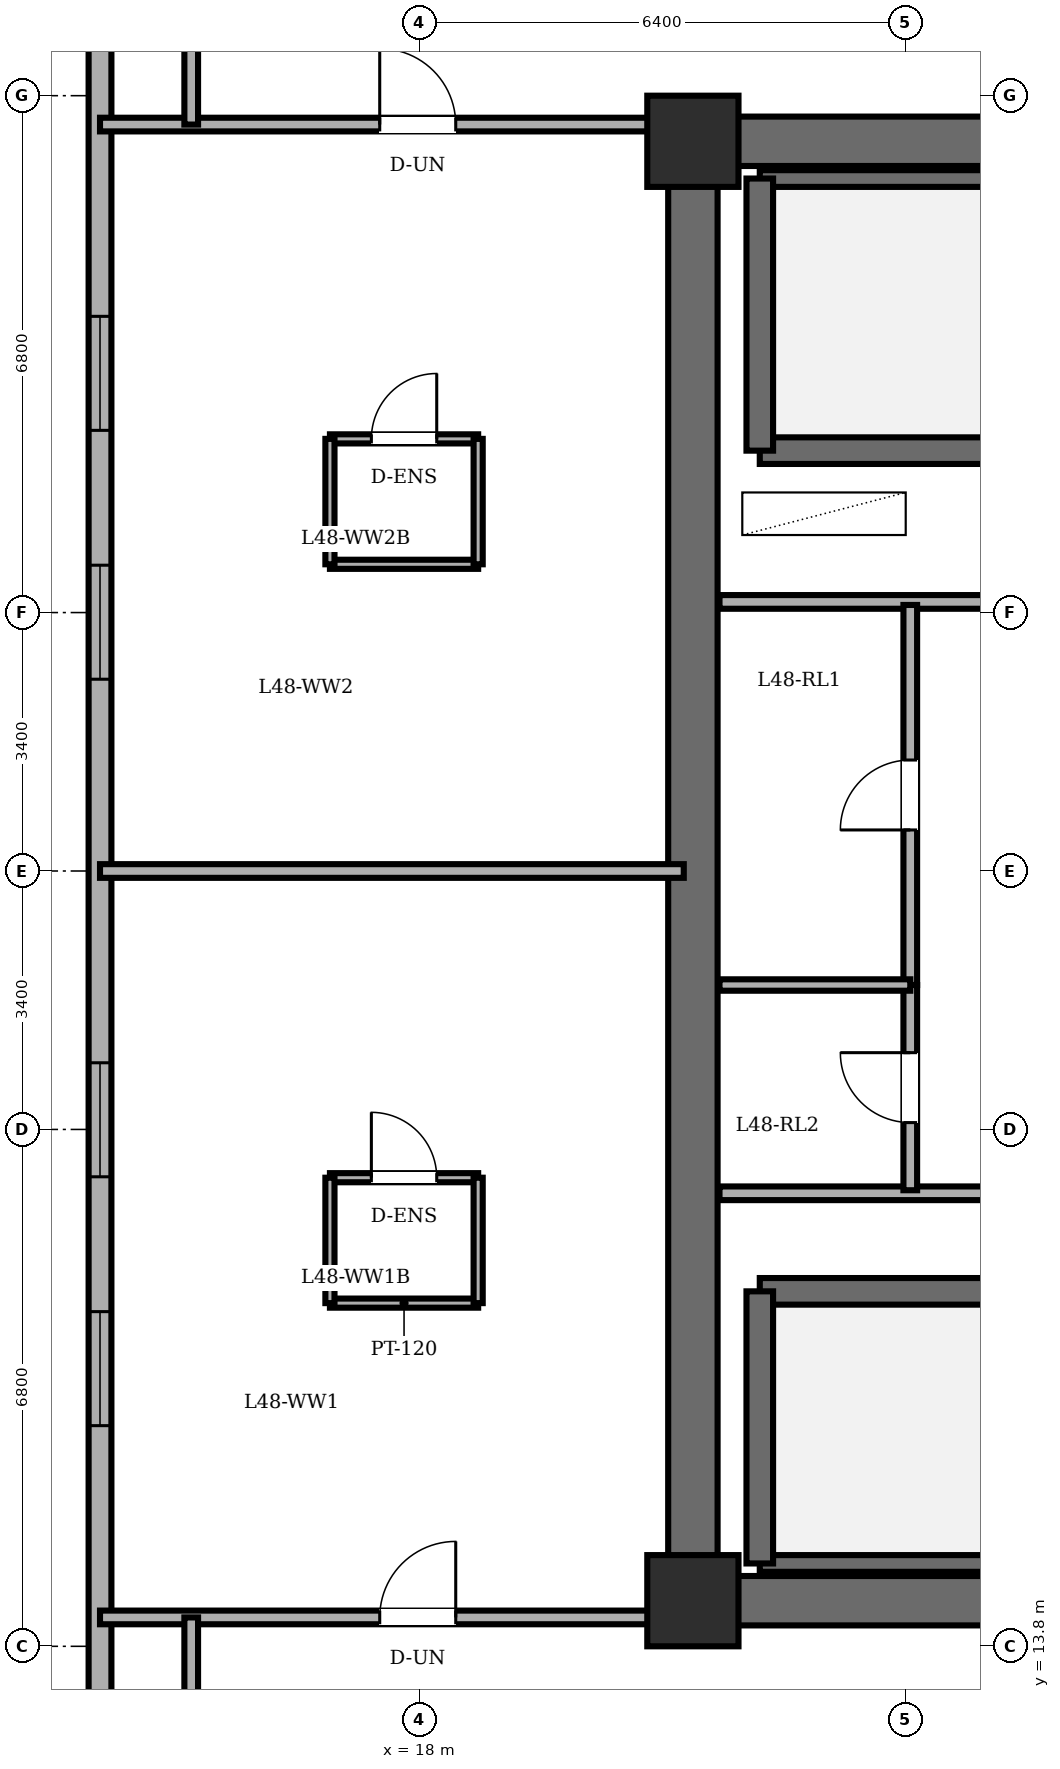
"""IFC4 building model, lengths in metres.
Left out: names, types, materials, properties, quantities, classifications, styles, units other than length and angle.
Written with IfcOpenShell. Run it as: python <this file> out.ifc"""

import sys

from ifc_helpers import new_model, si_unit, direction, frame, frame_2d, origin, origin_2d, place, context, subcontext, project, spatial, rectangle, extrude, element, fill, save


model = new_model("IFC4")
c1 = context("Model", 3, precision=1e-05, world=origin(), true_north=direction((0.0, 1.0)))
c2 = subcontext(c1, "Body", "Model", "MODEL_VIEW")
j1 = project(units=[si_unit("LENGTHUNIT", "METRE"), si_unit("PLANEANGLEUNIT", "RADIAN")], contexts=[c1])
p1 = place(None, origin())
s1 = spatial("IfcSite", under=j1, at=p1, CompositionType="ELEMENT")
p2 = place(p1, origin())
s2 = spatial("IfcBuilding", under=s1, at=p2, CompositionType="ELEMENT")
p3 = place(p2, frame((0.0, 0.0, 183.4)))
s3 = spatial("IfcBuildingStorey", under=s2, at=p3, CompositionType="ELEMENT", Elevation=183.4)
for number, where, z_axis, x_axis in (
    (1, (21.6, 14.4, 0.0), (0.0, 0.0, 1.0), (1.0, 0.0, 0.0)),
    (2, (21.6, 33.6, 0.0), (0.0, 0.0, 1.0), (1.0, 0.0, 0.0)),
):
    element("IfcColumn", number, at=place(p3, frame(where, z_axis=z_axis, x_axis=x_axis)), inside=s3, PredefinedType="COLUMN", context=c2, shape_type="SweptSolid", body=[
        extrude(rectangle(XDim=1.2, YDim=1.2, at=origin_2d()), origin(), (0.0, 0.0, 1.0), 3.6),
    ])
p4 = place(p3, frame((13.8, 36.3, 0.0), z_axis=(0.0, 0.0, 1.0), x_axis=(0.0, -1.0, 0.0)))
e3 = element("IfcWall", 3, at=p4, inside=s3, PredefinedType="SOLIDWALL", context=c2, shape_type="SweptSolid", body=[
    extrude(rectangle(XDim=24.6, YDim=0.3, at=frame_2d((12.3, 0.0))), origin(), (0.0, 0.0, 1.0), 3.4),
])
p5 = place(p4, frame((5.003, 0.0, 0.85)))
e4 = element("IfcOpeningElement", 4, at=p5, cuts=e3, PredefinedType="OPENING", context=c2, shape_type="SweptSolid", body=[
    extrude(rectangle(XDim=1.5, YDim=1.55, at=frame_2d((0.75, 0.775))), frame((0.0, 0.16, 0.0), z_axis=(0.0, -1.0, 0.0), x_axis=(1.0, 0.0, 0.0)), (0.0, 0.0, 1.0), 0.32),
])
p6 = place(p4, frame((8.277, 0.0, 0.85)))
e5 = element("IfcOpeningElement", 5, at=p6, cuts=e3, PredefinedType="OPENING", context=c2, shape_type="SweptSolid", body=[
    extrude(rectangle(XDim=1.5, YDim=1.55, at=frame_2d((0.75, 0.775))), frame((0.0, 0.16, 0.0), z_axis=(0.0, -1.0, 0.0), x_axis=(1.0, 0.0, 0.0)), (0.0, 0.0, 1.0), 0.32),
])
p7 = place(p4, frame((14.823, 0.0, 0.85)))
e6 = element("IfcOpeningElement", 6, at=p7, cuts=e3, PredefinedType="OPENING", context=c2, shape_type="SweptSolid", body=[
    extrude(rectangle(XDim=1.5, YDim=1.55, at=frame_2d((0.75, 0.775))), frame((0.0, 0.16, 0.0), z_axis=(0.0, -1.0, 0.0), x_axis=(1.0, 0.0, 0.0)), (0.0, 0.0, 1.0), 0.32),
])
p8 = place(p4, frame((18.097, 0.0, 0.85)))
e7 = element("IfcOpeningElement", 7, at=p8, cuts=e3, PredefinedType="OPENING", context=c2, shape_type="SweptSolid", body=[
    extrude(rectangle(XDim=1.5, YDim=1.55, at=frame_2d((0.75, 0.775))), frame((0.0, 0.16, 0.0), z_axis=(0.0, -1.0, 0.0), x_axis=(1.0, 0.0, 0.0)), (0.0, 0.0, 1.0), 0.32),
])
p9 = place(p3, frame((21.6, 14.4, 0.0), z_axis=(0.0, 0.0, 1.0), x_axis=(0.0, 1.0, 0.0)))
e8 = element("IfcWall", 8, at=p9, inside=s3, PredefinedType="SHEAR", context=c2, shape_type="SweptSolid", body=[
    extrude(rectangle(XDim=19.2, YDim=0.65, at=frame_2d((9.6, 0.0))), origin(), (0.0, 0.0, 1.0), 3.4),
])
for number, where, z_axis, x_axis in (
    (9, (21.6, 33.6, 0.0), (0.0, 0.0, 1.0), (1.0, 0.0, 0.0)),
    (10, (37.2, 14.4, 0.0), (0.0, 0.0, 1.0), (-1.0, 0.0, 0.0)),
):
    element("IfcWall", number, at=place(p3, frame(where, z_axis=z_axis, x_axis=x_axis)), inside=s3, PredefinedType="SHEAR", context=c2, shape_type="SweptSolid", body=[
        extrude(rectangle(XDim=15.6, YDim=0.65, at=frame_2d((7.8, 0.0))), origin(), (0.0, 0.0, 1.0), 3.4),
    ])
p10 = place(p3, frame((22.48, 29.53, 0.0), z_axis=(0.0, 0.0, 1.0), x_axis=(1.0, 0.0, 0.0)))
e11 = element("IfcWall", 11, at=p10, inside=s3, PredefinedType="SOLIDWALL", context=c2, shape_type="SweptSolid", body=[
    extrude(rectangle(XDim=7.79, YDim=0.35, at=frame_2d((3.895, 0.0))), origin(), (0.0, 0.0, 1.0), 3.4),
])
p11 = place(p3, frame((22.48, 33.11, 0.0), z_axis=(0.0, 0.0, 1.0), x_axis=(1.0, 0.0, 0.0)))
e12 = element("IfcWall", 12, at=p11, inside=s3, PredefinedType="PARTITIONING", context=c2, shape_type="SweptSolid", body=[
    extrude(rectangle(XDim=7.79, YDim=0.22, at=frame_2d((3.895, 0.0))), origin(), (0.0, 0.0, 1.0), 3.4),
])
p12 = place(p3, frame((22.48, 29.53, 0.0), z_axis=(0.0, 0.0, 1.0), x_axis=(0.0, 1.0, 0.0)))
e13 = element("IfcWall", 13, at=p12, inside=s3, PredefinedType="SOLIDWALL", context=c2, shape_type="SweptSolid", body=[
    extrude(rectangle(XDim=3.58, YDim=0.35, at=frame_2d((1.79, 0.0))), origin(), (0.0, 0.0, 1.0), 3.4),
])
p13 = place(p3, frame((22.48, 18.47, 0.0), z_axis=(0.0, 0.0, 1.0), x_axis=(1.0, 0.0, 0.0)))
e14 = element("IfcWall", 14, at=p13, inside=s3, PredefinedType="SOLIDWALL", context=c2, shape_type="SweptSolid", body=[
    extrude(rectangle(XDim=7.79, YDim=0.35, at=frame_2d((3.895, 0.0))), origin(), (0.0, 0.0, 1.0), 3.4),
])
p14 = place(p3, frame((22.48, 14.89, 0.0), z_axis=(0.0, 0.0, 1.0), x_axis=(1.0, 0.0, 0.0)))
e15 = element("IfcWall", 15, at=p14, inside=s3, PredefinedType="PARTITIONING", context=c2, shape_type="SweptSolid", body=[
    extrude(rectangle(XDim=7.79, YDim=0.22, at=frame_2d((3.895, 0.0))), origin(), (0.0, 0.0, 1.0), 3.4),
])
p15 = place(p3, frame((22.48, 14.89, 0.0), z_axis=(0.0, 0.0, 1.0), x_axis=(0.0, 1.0, 0.0)))
e16 = element("IfcWall", 16, at=p15, inside=s3, PredefinedType="SOLIDWALL", context=c2, shape_type="SweptSolid", body=[
    extrude(rectangle(XDim=3.58, YDim=0.35, at=frame_2d((1.79, 0.0))), origin(), (0.0, 0.0, 1.0), 3.4),
])
p16 = place(p3, frame((21.95, 27.54, 0.0), z_axis=(0.0, 0.0, 1.0), x_axis=(1.0, 0.0, 0.0)))
e17 = element("IfcWall", 17, at=p16, inside=s3, PredefinedType="PARTITIONING", context=c2, shape_type="SweptSolid", body=[
    extrude(rectangle(XDim=10.56, YDim=0.18, at=frame_2d((5.28, 0.0))), origin(), (0.0, 0.0, 1.0), 3.4),
])
p17 = place(p3, frame((21.95, 19.76, 0.0), z_axis=(0.0, 0.0, 1.0), x_axis=(1.0, 0.0, 0.0)))
e18 = element("IfcWall", 18, at=p17, inside=s3, PredefinedType="PARTITIONING", context=c2, shape_type="SweptSolid", body=[
    extrude(rectangle(XDim=14.87, YDim=0.18, at=frame_2d((7.435, 0.0))), origin(), (0.0, 0.0, 1.0), 3.4),
])
p18 = place(p3, frame((24.46, 22.5, 0.0), z_axis=(0.0, 0.0, 1.0), x_axis=(0.0, 1.0, 0.0)))
e19 = element("IfcWall", 19, at=p18, inside=s3, PredefinedType="PARTITIONING", context=c2, shape_type="SweptSolid", body=[
    extrude(rectangle(XDim=5.0, YDim=0.18, at=frame_2d((2.5, 0.0))), origin(), (0.0, 0.0, 1.0), 3.4),
])
p19 = place(p18, frame((2.04, 0.0, 0.0)))
e20 = element("IfcOpeningElement", 20, at=p19, cuts=e19, PredefinedType="OPENING", context=c2, shape_type="SweptSolid", body=[
    extrude(rectangle(XDim=0.92, YDim=2.1, at=frame_2d((0.46, 1.05))), frame((0.0, 0.1, 0.0), z_axis=(0.0, -1.0, 0.0), x_axis=(1.0, 0.0, 0.0)), (0.0, 0.0, 1.0), 0.2),
])
p20 = place(p3, frame((24.46, 19.8, 0.0), z_axis=(0.0, 0.0, 1.0), x_axis=(0.0, 1.0, 0.0)))
e21 = element("IfcWall", 21, at=p20, inside=s3, PredefinedType="PARTITIONING", context=c2, shape_type="SweptSolid", body=[
    extrude(rectangle(XDim=2.7, YDim=0.18, at=frame_2d((1.35, 0.0))), origin(), (0.0, 0.0, 1.0), 3.4),
])
p21 = place(p20, frame((0.89, 0.0, 0.0)))
e22 = element("IfcOpeningElement", 22, at=p21, cuts=e21, PredefinedType="OPENING", context=c2, shape_type="SweptSolid", body=[
    extrude(rectangle(XDim=0.92, YDim=2.1, at=frame_2d((0.46, 1.05))), frame((0.0, 0.1, 0.0), z_axis=(0.0, -1.0, 0.0), x_axis=(1.0, 0.0, 0.0)), (0.0, 0.0, 1.0), 0.2),
])
p22 = place(p3, frame((21.95, 22.5, 0.0), z_axis=(0.0, 0.0, 1.0), x_axis=(1.0, 0.0, 0.0)))
e23 = element("IfcWall", 23, at=p22, inside=s3, PredefinedType="PARTITIONING", context=c2, shape_type="SweptSolid", body=[
    extrude(rectangle(XDim=2.51, YDim=0.15, at=frame_2d((1.255, 0.0))), origin(), (0.0, 0.0, 1.0), 3.4),
])
p23 = place(p3, frame((16.825, 19.965, 0.0), z_axis=(0.0, 0.0, 1.0), x_axis=(1.0, 0.0, 0.0)))
e24 = element("IfcWall", 24, at=p23, inside=s3, PredefinedType="PARTITIONING", context=c2, shape_type="SweptSolid", body=[
    extrude(rectangle(XDim=1.95, YDim=0.12, at=frame_2d((0.975, 0.0))), origin(), (0.0, 0.0, 1.0), 3.4),
])
p24 = place(p23, frame((0.545, 0.0, 0.0)))
e25 = element("IfcOpeningElement", 25, at=p24, cuts=e24, PredefinedType="OPENING", context=c2, shape_type="SweptSolid", body=[
    extrude(rectangle(XDim=0.86, YDim=2.1, at=frame_2d((0.43, 1.05))), frame((0.0, 0.07, 0.0), z_axis=(0.0, -1.0, 0.0), x_axis=(1.0, 0.0, 0.0)), (0.0, 0.0, 1.0), 0.14),
])
p25 = place(p3, frame((18.775, 18.315, 0.0), z_axis=(0.0, 0.0, 1.0), x_axis=(-1.0, 0.0, 0.0)))
e26 = element("IfcWall", 26, at=p25, inside=s3, PredefinedType="PARTITIONING", context=c2, shape_type="SweptSolid", body=[
    extrude(rectangle(XDim=1.95, YDim=0.12, at=frame_2d((0.975, 0.0))), origin(), (0.0, 0.0, 1.0), 3.4),
])
for number, where, z_axis, x_axis in (
    (27, (16.825, 19.965, 0.0), (0.0, 0.0, 1.0), (0.0, -1.0, 0.0)),
    (28, (18.775, 18.315, 0.0), (0.0, 0.0, 1.0), (0.0, 1.0, 0.0)),
):
    element("IfcWall", number, at=place(p3, frame(where, z_axis=z_axis, x_axis=x_axis)), inside=s3, PredefinedType="PARTITIONING", context=c2, shape_type="SweptSolid", body=[
        extrude(rectangle(XDim=1.65, YDim=0.12, at=frame_2d((0.825, 0.0))), origin(), (0.0, 0.0, 1.0), 3.4),
    ])
p26 = place(p3, frame((16.825, 29.685, 0.0), z_axis=(0.0, 0.0, 1.0), x_axis=(1.0, 0.0, 0.0)))
e29 = element("IfcWall", 29, at=p26, inside=s3, PredefinedType="PARTITIONING", context=c2, shape_type="SweptSolid", body=[
    extrude(rectangle(XDim=1.95, YDim=0.12, at=frame_2d((0.975, 0.0))), origin(), (0.0, 0.0, 1.0), 3.4),
])
p27 = place(p26, frame((0.545, 0.0, 0.0)))
e30 = element("IfcOpeningElement", 30, at=p27, cuts=e29, PredefinedType="OPENING", context=c2, shape_type="SweptSolid", body=[
    extrude(rectangle(XDim=0.86, YDim=2.1, at=frame_2d((0.43, 1.05))), frame((0.0, 0.07, 0.0), z_axis=(0.0, -1.0, 0.0), x_axis=(1.0, 0.0, 0.0)), (0.0, 0.0, 1.0), 0.14),
])
p28 = place(p3, frame((18.775, 28.035, 0.0), z_axis=(0.0, 0.0, 1.0), x_axis=(-1.0, 0.0, 0.0)))
e31 = element("IfcWall", 31, at=p28, inside=s3, PredefinedType="PARTITIONING", context=c2, shape_type="SweptSolid", body=[
    extrude(rectangle(XDim=1.95, YDim=0.12, at=frame_2d((0.975, 0.0))), origin(), (0.0, 0.0, 1.0), 3.4),
])
for number, where, z_axis, x_axis in (
    (32, (16.825, 29.685, 0.0), (0.0, 0.0, 1.0), (0.0, -1.0, 0.0)),
    (33, (18.775, 28.035, 0.0), (0.0, 0.0, 1.0), (0.0, 1.0, 0.0)),
):
    element("IfcWall", number, at=place(p3, frame(where, z_axis=z_axis, x_axis=x_axis)), inside=s3, PredefinedType="PARTITIONING", context=c2, shape_type="SweptSolid", body=[
        extrude(rectangle(XDim=1.65, YDim=0.12, at=frame_2d((0.825, 0.0))), origin(), (0.0, 0.0, 1.0), 3.4),
    ])
p29 = place(p3, frame((13.8, 14.18, 0.0), z_axis=(0.0, 0.0, 1.0), x_axis=(1.0, 0.0, 0.0)))
e34 = element("IfcWall", 34, at=p29, inside=s3, PredefinedType="PARTITIONING", context=c2, shape_type="SweptSolid", body=[
    extrude(rectangle(XDim=7.68, YDim=0.18, at=frame_2d((3.84, 0.0))), origin(), (0.0, 0.0, 1.0), 3.4),
])
p30 = place(p29, frame((3.68, 0.0, 0.0)))
e35 = element("IfcOpeningElement", 35, at=p30, cuts=e34, PredefinedType="OPENING", context=c2, shape_type="SweptSolid", body=[
    extrude(rectangle(XDim=1.0, YDim=2.15, at=frame_2d((0.5, 1.075))), frame((0.0, 0.1, 0.0), z_axis=(0.0, -1.0, 0.0), x_axis=(1.0, 0.0, 0.0)), (0.0, 0.0, 1.0), 0.2),
])
p31 = place(p3, frame((13.8, 24.0, 0.0), z_axis=(0.0, 0.0, 1.0), x_axis=(1.0, 0.0, 0.0)))
e36 = element("IfcWall", 36, at=p31, inside=s3, PredefinedType="PARTITIONING", context=c2, shape_type="SweptSolid", body=[
    extrude(rectangle(XDim=7.68, YDim=0.18, at=frame_2d((3.84, 0.0))), origin(), (0.0, 0.0, 1.0), 3.4),
])
p32 = place(p3, frame((13.8, 33.82, 0.0), z_axis=(0.0, 0.0, 1.0), x_axis=(1.0, 0.0, 0.0)))
e37 = element("IfcWall", 37, at=p32, inside=s3, PredefinedType="PARTITIONING", context=c2, shape_type="SweptSolid", body=[
    extrude(rectangle(XDim=7.68, YDim=0.18, at=frame_2d((3.84, 0.0))), origin(), (0.0, 0.0, 1.0), 3.4),
])
p33 = place(p32, frame((3.68, 0.0, 0.0)))
e38 = element("IfcOpeningElement", 38, at=p33, cuts=e37, PredefinedType="OPENING", context=c2, shape_type="SweptSolid", body=[
    extrude(rectangle(XDim=1.0, YDim=2.15, at=frame_2d((0.5, 1.075))), frame((0.0, 0.1, 0.0), z_axis=(0.0, -1.0, 0.0), x_axis=(1.0, 0.0, 0.0)), (0.0, 0.0, 1.0), 0.2),
])
for number, where, z_axis, x_axis in (
    (39, (15.0, 8.487, 0.0), (0.0, 0.0, 1.0), (0.0, 1.0, 0.0)),
    (40, (15.0, 33.82, 0.0), (0.0, 0.0, 1.0), (0.0, 1.0, 0.0)),
):
    element("IfcWall", number, at=place(p3, frame(where, z_axis=z_axis, x_axis=x_axis)), inside=s3, PredefinedType="PARTITIONING", context=c2, shape_type="SweptSolid", body=[
        extrude(rectangle(XDim=5.693, YDim=0.18, at=frame_2d((2.846, 0.0))), origin(), (0.0, 0.0, 1.0), 3.4),
    ])
p34 = place(p5, origin())
e41 = element("IfcWindow", 41, at=p34, inside=s3, PartitioningType="DOUBLE_PANEL_VERTICAL", PredefinedType="WINDOW", context=c2, shape_type="SweptSolid", body=[
    extrude(rectangle(XDim=1.5, YDim=1.55, at=frame_2d((0.75, 0.775))), frame((0.0, 0.03, 0.0), z_axis=(0.0, -1.0, 0.0), x_axis=(1.0, 0.0, 0.0)), (0.0, 0.0, 1.0), 0.06),
])
fill(e4, e41)
p35 = place(p6, origin())
e42 = element("IfcWindow", 42, at=p35, inside=s3, PartitioningType="DOUBLE_PANEL_VERTICAL", PredefinedType="WINDOW", context=c2, shape_type="SweptSolid", body=[
    extrude(rectangle(XDim=1.5, YDim=1.55, at=frame_2d((0.75, 0.775))), frame((0.0, 0.03, 0.0), z_axis=(0.0, -1.0, 0.0), x_axis=(1.0, 0.0, 0.0)), (0.0, 0.0, 1.0), 0.06),
])
fill(e5, e42)
p36 = place(p7, origin())
e43 = element("IfcWindow", 43, at=p36, inside=s3, PartitioningType="DOUBLE_PANEL_VERTICAL", PredefinedType="WINDOW", context=c2, shape_type="SweptSolid", body=[
    extrude(rectangle(XDim=1.5, YDim=1.55, at=frame_2d((0.75, 0.775))), frame((0.0, 0.03, 0.0), z_axis=(0.0, -1.0, 0.0), x_axis=(1.0, 0.0, 0.0)), (0.0, 0.0, 1.0), 0.06),
])
fill(e6, e43)
p37 = place(p8, origin())
e44 = element("IfcWindow", 44, at=p37, inside=s3, PartitioningType="DOUBLE_PANEL_VERTICAL", PredefinedType="WINDOW", context=c2, shape_type="SweptSolid", body=[
    extrude(rectangle(XDim=1.5, YDim=1.55, at=frame_2d((0.75, 0.775))), frame((0.0, 0.03, 0.0), z_axis=(0.0, -1.0, 0.0), x_axis=(1.0, 0.0, 0.0)), (0.0, 0.0, 1.0), 0.06),
])
fill(e7, e44)
p38 = place(p19, origin())
e45 = element("IfcDoor", 45, at=p38, inside=s3, OperationType="SINGLE_SWING_LEFT", PredefinedType="DOOR", context=c2, shape_type="SweptSolid", body=[
    extrude(rectangle(XDim=0.92, YDim=2.1, at=frame_2d((0.46, 1.05))), frame((0.0, 0.025, 0.0), z_axis=(0.0, -1.0, 0.0), x_axis=(1.0, 0.0, 0.0)), (0.0, 0.0, 1.0), 0.05),
])
fill(e20, e45)
p39 = place(p21, origin())
e46 = element("IfcDoor", 46, at=p39, inside=s3, OperationType="SINGLE_SWING_RIGHT", PredefinedType="DOOR", context=c2, shape_type="SweptSolid", body=[
    extrude(rectangle(XDim=0.92, YDim=2.1, at=frame_2d((0.46, 1.05))), frame((0.0, 0.025, 0.0), z_axis=(0.0, -1.0, 0.0), x_axis=(1.0, 0.0, 0.0)), (0.0, 0.0, 1.0), 0.05),
])
fill(e22, e46)
p40 = place(p24, origin())
e47 = element("IfcDoor", 47, at=p40, inside=s3, OperationType="SINGLE_SWING_LEFT", PredefinedType="DOOR", context=c2, shape_type="SweptSolid", body=[
    extrude(rectangle(XDim=0.86, YDim=2.1, at=frame_2d((0.43, 1.05))), frame((0.0, 0.025, 0.0), z_axis=(0.0, -1.0, 0.0), x_axis=(1.0, 0.0, 0.0)), (0.0, 0.0, 1.0), 0.05),
])
fill(e25, e47)
p41 = place(p27, origin())
e48 = element("IfcDoor", 48, at=p41, inside=s3, OperationType="SINGLE_SWING_RIGHT", PredefinedType="DOOR", context=c2, shape_type="SweptSolid", body=[
    extrude(rectangle(XDim=0.86, YDim=2.1, at=frame_2d((0.43, 1.05))), frame((0.0, 0.025, 0.0), z_axis=(0.0, -1.0, 0.0), x_axis=(1.0, 0.0, 0.0)), (0.0, 0.0, 1.0), 0.05),
])
fill(e30, e48)
p42 = place(p30, origin())
e49 = element("IfcDoor", 49, at=p42, inside=s3, OperationType="SINGLE_SWING_RIGHT", PredefinedType="DOOR", context=c2, shape_type="SweptSolid", body=[
    extrude(rectangle(XDim=1.0, YDim=2.15, at=frame_2d((0.5, 1.075))), frame((0.0, 0.025, 0.0), z_axis=(0.0, -1.0, 0.0), x_axis=(1.0, 0.0, 0.0)), (0.0, 0.0, 1.0), 0.05),
])
fill(e35, e49)
p43 = place(p33, origin())
e50 = element("IfcDoor", 50, at=p43, inside=s3, OperationType="SINGLE_SWING_LEFT", PredefinedType="DOOR", context=c2, shape_type="SweptSolid", body=[
    extrude(rectangle(XDim=1.0, YDim=2.15, at=frame_2d((0.5, 1.075))), frame((0.0, 0.025, 0.0), z_axis=(0.0, -1.0, 0.0), x_axis=(1.0, 0.0, 0.0)), (0.0, 0.0, 1.0), 0.05),
])
fill(e38, e50)
save(model, sys.argv[1])
